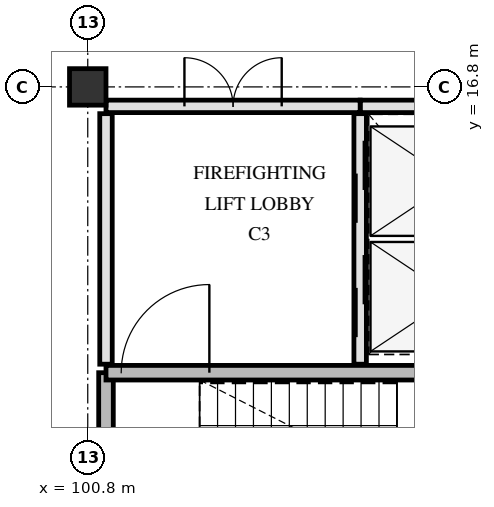
"""IFC4 building model, lengths in metres.
Left out: names, types, materials, properties, quantities, classifications, styles, units other than length and angle.
Written with IfcOpenShell. Run it as: python <this file> out.ifc"""

import sys

from ifc_helpers import new_model, si_unit, direction, frame, frame_2d, origin, origin_2d, place, context, subcontext, project, spatial, rectangle, extrude, element, fill, save


model = new_model("IFC4")
c1 = context("Model", 3, precision=1e-05, world=origin(), true_north=direction((0.0, 1.0)))
c2 = subcontext(c1, "Body", "Model", "MODEL_VIEW")
j1 = project(units=[si_unit("LENGTHUNIT", "METRE"), si_unit("PLANEANGLEUNIT", "RADIAN")], contexts=[c1])
p1 = place(None, origin())
s1 = spatial("IfcSite", under=j1, at=p1, CompositionType="ELEMENT")
p2 = place(p1, origin())
s2 = spatial("IfcBuilding", under=s1, at=p2, CompositionType="ELEMENT")
p3 = place(p2, frame((0.0, 0.0, 18.6)))
s3 = spatial("IfcBuildingStorey", under=s2, at=p3, CompositionType="ELEMENT", Elevation=18.6)
p4 = place(p3, frame((100.8, 16.8, 0.0), z_axis=(0.0, 0.0, 1.0), x_axis=(1.0, 0.0, 0.0)))
e1 = element("IfcColumn", 1, at=p4, inside=s3, PredefinedType="COLUMN", context=c2, shape_type="SweptSolid", body=[
    extrude(rectangle(XDim=0.6, YDim=0.6, at=origin_2d()), origin(), (0.0, 0.0, 1.0), 3.9),
])
p5 = place(p3, frame((101.1, 8.78, 0.0), z_axis=(0.0, 0.0, 1.0), x_axis=(0.0, 1.0, 0.0)))
e2 = element("IfcWall", 2, at=p5, inside=s3, PredefinedType="SHEAR", context=c2, shape_type="SweptSolid", body=[
    extrude(rectangle(XDim=3.32, YDim=0.24, at=frame_2d((1.66, 0.0))), origin(), (0.0, 0.0, 1.0), 3.62),
])
p6 = place(p3, frame((101.1, 12.1, 0.0), z_axis=(0.0, 0.0, 1.0), x_axis=(1.0, 0.0, 0.0)))
e3 = element("IfcWall", 3, at=p6, inside=s3, PredefinedType="SHEAR", context=c2, shape_type="SweptSolid", body=[
    extrude(rectangle(XDim=7.82, YDim=0.24, at=frame_2d((3.91, 0.0))), origin(), (0.0, 0.0, 1.0), 3.62),
])
p7 = place(p6, frame((0.25, 0.0, 0.0)))
e4 = element("IfcOpeningElement", 4, at=p7, cuts=e3, PredefinedType="OPENING", context=c2, shape_type="SweptSolid", body=[
    extrude(rectangle(XDim=1.45, YDim=2.2, at=frame_2d((0.725, 1.1))), frame((0.0, 0.13, 0.0), z_axis=(0.0, -1.0, 0.0), x_axis=(1.0, 0.0, 0.0)), (0.0, 0.0, 1.0), 0.26),
])
p8 = place(p3, frame((105.28, 12.24, 0.0), z_axis=(0.0, 0.0, 1.0), x_axis=(0.0, 1.0, 0.0)))
e5 = element("IfcWall", 5, at=p8, inside=s3, PredefinedType="PARTITIONING", context=c2, shape_type="SweptSolid", body=[
    extrude(rectangle(XDim=4.12, YDim=0.205, at=frame_2d((2.06, 0.0))), origin(), (0.0, 0.0, 1.0), 3.61),
])
p9 = place(p8, frame((0.445, 0.0, 0.0)))
e6 = element("IfcOpeningElement", 6, at=p9, cuts=e5, PredefinedType="OPENING", context=c2, shape_type="SweptSolid", body=[
    extrude(rectangle(XDim=1.35, YDim=2.2, at=frame_2d((0.675, 1.1))), frame((0.0, 0.113, 0.0), z_axis=(0.0, -1.0, 0.0), x_axis=(1.0, 0.0, 0.0)), (0.0, 0.0, 1.0), 0.225),
])
p10 = place(p8, frame((2.325, 0.0, 0.0)))
e7 = element("IfcOpeningElement", 7, at=p10, cuts=e5, PredefinedType="OPENING", context=c2, shape_type="SweptSolid", body=[
    extrude(rectangle(XDim=1.35, YDim=2.2, at=frame_2d((0.675, 1.1))), frame((0.0, 0.113, 0.0), z_axis=(0.0, -1.0, 0.0), x_axis=(1.0, 0.0, 0.0)), (0.0, 0.0, 1.0), 0.225),
])
p11 = place(p3, frame((105.28, 16.48, 0.0), z_axis=(0.0, 0.0, 1.0), x_axis=(1.0, 0.0, 0.0)))
e8 = element("IfcWall", 8, at=p11, inside=s3, PredefinedType="PARTITIONING", context=c2, shape_type="SweptSolid", body=[
    extrude(rectangle(XDim=3.57, YDim=0.205, at=frame_2d((1.785, 0.0))), origin(), (0.0, 0.0, 1.0), 3.61),
])
p12 = place(p3, frame((101.1, 12.24, 0.0), z_axis=(0.0, 0.0, 1.0), x_axis=(0.0, 1.0, 0.0)))
e9 = element("IfcWall", 9, at=p12, inside=s3, PredefinedType="PARTITIONING", context=c2, shape_type="SweptSolid", body=[
    extrude(rectangle(XDim=4.12, YDim=0.205, at=frame_2d((2.06, 0.0))), origin(), (0.0, 0.0, 1.0), 3.61),
])
p13 = place(p3, frame((101.1, 16.48, 0.0), z_axis=(0.0, 0.0, 1.0), x_axis=(1.0, 0.0, 0.0)))
e10 = element("IfcWall", 10, at=p13, inside=s3, PredefinedType="PARTITIONING", context=c2, shape_type="SweptSolid", body=[
    extrude(rectangle(XDim=4.18, YDim=0.205, at=frame_2d((2.09, 0.0))), origin(), (0.0, 0.0, 1.0), 3.61),
])
p14 = place(p13, frame((1.29, 0.0, 0.0)))
e11 = element("IfcOpeningElement", 11, at=p14, cuts=e10, PredefinedType="OPENING", context=c2, shape_type="SweptSolid", body=[
    extrude(rectangle(XDim=1.6, YDim=2.25, at=frame_2d((0.8, 1.125))), frame((0.0, 0.113, 0.0), z_axis=(0.0, -1.0, 0.0), x_axis=(1.0, 0.0, 0.0)), (0.0, 0.0, 1.0), 0.225),
])
p15 = place(p7, origin())
e12 = element("IfcDoor", 12, at=p15, inside=s3, OperationType="SINGLE_SWING_RIGHT", PredefinedType="DOOR", context=c2, shape_type="SweptSolid", body=[
    extrude(rectangle(XDim=1.45, YDim=2.2, at=frame_2d((0.725, 1.1))), frame((0.0, 0.025, 0.0), z_axis=(0.0, -1.0, 0.0), x_axis=(1.0, 0.0, 0.0)), (0.0, 0.0, 1.0), 0.05),
])
fill(e4, e12)
p16 = place(p9, origin())
e13 = element("IfcDoor", 13, at=p16, inside=s3, OperationType="SLIDING_TO_LEFT", PredefinedType="DOOR", context=c2, shape_type="SweptSolid", body=[
    extrude(rectangle(XDim=1.35, YDim=2.2, at=frame_2d((0.675, 1.1))), frame((0.0, 0.025, 0.0), z_axis=(0.0, -1.0, 0.0), x_axis=(1.0, 0.0, 0.0)), (0.0, 0.0, 1.0), 0.05),
])
fill(e6, e13)
p17 = place(p10, origin())
e14 = element("IfcDoor", 14, at=p17, inside=s3, OperationType="SLIDING_TO_LEFT", PredefinedType="DOOR", context=c2, shape_type="SweptSolid", body=[
    extrude(rectangle(XDim=1.35, YDim=2.2, at=frame_2d((0.675, 1.1))), frame((0.0, 0.025, 0.0), z_axis=(0.0, -1.0, 0.0), x_axis=(1.0, 0.0, 0.0)), (0.0, 0.0, 1.0), 0.05),
])
fill(e7, e14)
p18 = place(p14, origin())
e15 = element("IfcDoor", 15, at=p18, inside=s3, OperationType="DOUBLE_SWING_LEFT", PredefinedType="DOOR", context=c2, shape_type="SweptSolid", body=[
    extrude(rectangle(XDim=1.6, YDim=2.25, at=frame_2d((0.8, 1.125))), frame((0.0, 0.025, 0.0), z_axis=(0.0, -1.0, 0.0), x_axis=(1.0, 0.0, 0.0)), (0.0, 0.0, 1.0), 0.05),
])
fill(e11, e15)
save(model, sys.argv[1])
